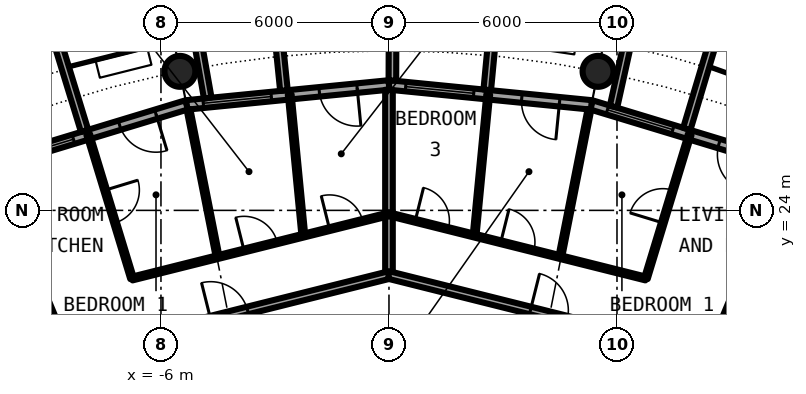
"""IFC4 building model, lengths in metres.
Left out: names, types, materials, properties, quantities, classifications, styles, units other than length and angle.
Written with IfcOpenShell. Run it as: python <this file> out.ifc"""

import sys

from ifc_helpers import new_model, si_unit, direction, frame, frame_2d, origin, origin_2d, place, context, subcontext, project, spatial, rectangle, circle, hollow_circle, extrude, element, fill, save


model = new_model("IFC4")
c1 = context("Model", 3, precision=1e-05, world=origin(), true_north=direction((0.0, 1.0)))
c2 = subcontext(c1, "Body", "Model", "MODEL_VIEW")
j1 = project(units=[si_unit("LENGTHUNIT", "METRE"), si_unit("PLANEANGLEUNIT", "RADIAN")], contexts=[c1])
p1 = place(None, origin())
s1 = spatial("IfcSite", under=j1, at=p1, CompositionType="ELEMENT")
p2 = place(p1, origin())
s2 = spatial("IfcBuilding", under=s1, at=p2, CompositionType="ELEMENT")
p3 = place(p2, frame((0.0, 0.0, 154.35)))
s3 = spatial("IfcBuildingStorey", under=s2, at=p3, CompositionType="ELEMENT", Elevation=154.35)
for number, where, z_axis, x_axis in (
    (1, (5.501, 27.658, 0.0), (0.0, 0.0, 1.0), (1.0, 0.0, 0.0)),
    (2, (-5.501, 27.658, 0.0), (0.0, 0.0, 1.0), (1.0, 0.0, 0.0)),
):
    element("IfcColumn", number, at=place(p3, frame(where, z_axis=z_axis, x_axis=x_axis)), inside=s3, PredefinedType="COLUMN", context=c2, shape_type="SweptSolid", body=[
        extrude(hollow_circle(Radius=0.406, WallThickness=0.04, at=origin_2d()), origin(), (0.0, 0.0, 1.0), 3.05),
    ])
p4 = place(p3, frame((10.447, 25.222, 0.0), z_axis=(0.0, 0.0, 1.0), x_axis=(-0.956965678721, 0.290201119486, 0.0)))
e3 = element("IfcWall", 3, at=p4, inside=s3, PredefinedType="SOLIDWALL", context=c2, shape_type="SweptSolid", body=[
    extrude(rectangle(XDim=5.351, YDim=0.25, at=frame_2d((2.676, 0.0))), origin(), (0.0, 0.0, 1.0), 2.7),
])
p5 = place(p4, frame((0.841, 0.0, 0.0)))
e4 = element("IfcOpeningElement", 4, at=p5, cuts=e3, PredefinedType="OPENING", context=c2, shape_type="SweptSolid", body=[
    extrude(rectangle(XDim=1.0, YDim=2.2, at=frame_2d((0.5, 1.1))), frame((0.0, 0.135, 0.0), z_axis=(0.0, -1.0, 0.0), x_axis=(1.0, 0.0, 0.0)), (0.0, 0.0, 1.0), 0.27),
])
p6 = place(p4, frame((3.111, 0.0, 0.3)))
e5 = element("IfcOpeningElement", 5, at=p6, cuts=e3, PredefinedType="OPENING", context=c2, shape_type="SweptSolid", body=[
    extrude(rectangle(XDim=1.8, YDim=2.1, at=frame_2d((0.9, 1.05))), frame((0.0, 0.135, 0.0), z_axis=(0.0, -1.0, 0.0), x_axis=(1.0, 0.0, 0.0)), (0.0, 0.0, 1.0), 0.27),
])
p7 = place(p3, frame((7.837, 26.144, -0.03), z_axis=(0.0, 0.0, 1.0), x_axis=(0.287064767992, 0.957911174889, 0.0)))
e6 = element("IfcWall", 6, at=p7, inside=s3, PredefinedType="SOLIDWALL", context=c2, shape_type="SweptSolid", body=[
    extrude(rectangle(XDim=3.006, YDim=0.2, at=frame_2d((1.503, 0.0))), origin(), (0.0, 0.0, 1.0), 2.73),
])
p8 = place(p3, frame((5.909, 26.729, -0.03), z_axis=(0.0, 0.0, 1.0), x_axis=(0.216409053917, 0.976302781612, 0.0)))
e7 = element("IfcWall", 7, at=p8, inside=s3, PredefinedType="SOLIDWALL", context=c2, shape_type="SweptSolid", body=[
    extrude(rectangle(XDim=2.925, YDim=0.2, at=frame_2d((1.463, 0.0))), origin(), (0.0, 0.0, 1.0), 2.73),
])
p9 = place(p3, frame((5.326, 26.775, 0.0), z_axis=(0.0, 0.0, 1.0), x_axis=(-0.995173996315, 0.098126026407, 0.0)))
e8 = element("IfcWall", 8, at=p9, inside=s3, PredefinedType="SOLIDWALL", context=c2, shape_type="SweptSolid", body=[
    extrude(rectangle(XDim=5.352, YDim=0.25, at=frame_2d((2.676, 0.0))), origin(), (0.0, 0.0, 1.0), 2.7),
])
p10 = place(p9, frame((0.841, 0.0, 0.0)))
e9 = element("IfcOpeningElement", 9, at=p10, cuts=e8, PredefinedType="OPENING", context=c2, shape_type="SweptSolid", body=[
    extrude(rectangle(XDim=1.0, YDim=2.2, at=frame_2d((0.5, 1.1))), frame((0.0, 0.135, 0.0), z_axis=(0.0, -1.0, 0.0), x_axis=(1.0, 0.0, 0.0)), (0.0, 0.0, 1.0), 0.27),
])
p11 = place(p9, frame((3.111, 0.0, 0.3)))
e10 = element("IfcOpeningElement", 10, at=p11, cuts=e8, PredefinedType="OPENING", context=c2, shape_type="SweptSolid", body=[
    extrude(rectangle(XDim=1.8, YDim=2.1, at=frame_2d((0.9, 1.05))), frame((0.0, 0.135, 0.0), z_axis=(0.0, -1.0, 0.0), x_axis=(1.0, 0.0, 0.0)), (0.0, 0.0, 1.0), 0.27),
])
p12 = place(p3, frame((2.586, 27.171, -0.03), z_axis=(0.0, 0.0, 1.0), x_axis=(0.094548432284, 0.995520262954, 0.0)))
e11 = element("IfcWall", 11, at=p12, inside=s3, PredefinedType="SOLIDWALL", context=c2, shape_type="SweptSolid", body=[
    extrude(rectangle(XDim=3.006, YDim=0.2, at=frame_2d((1.503, 0.0))), origin(), (0.0, 0.0, 1.0), 2.73),
])
p13 = place(p3, frame((0.09, 27.417, -0.03), z_axis=(0.0, 0.0, 1.0), x_axis=(0.00347308367, 0.999993968827, 0.0)))
e12 = element("IfcWall", 12, at=p13, inside=s3, PredefinedType="SOLIDWALL", context=c2, shape_type="SweptSolid", body=[
    extrude(rectangle(XDim=2.882, YDim=0.2, at=frame_2d((1.441, 0.0))), origin(), (0.0, 0.0, 1.0), 2.73),
])
p14 = place(p3, frame((0.0, 27.3, 0.0), z_axis=(0.0, 0.0, 1.0), x_axis=(-0.995173996315, -0.098126026407, 0.0)))
e13 = element("IfcWall", 13, at=p14, inside=s3, PredefinedType="SOLIDWALL", context=c2, shape_type="SweptSolid", body=[
    extrude(rectangle(XDim=5.352, YDim=0.25, at=frame_2d((2.676, 0.0))), origin(), (0.0, 0.0, 1.0), 2.7),
])
p15 = place(p14, frame((0.841, 0.0, 0.0)))
e14 = element("IfcOpeningElement", 14, at=p15, cuts=e13, PredefinedType="OPENING", context=c2, shape_type="SweptSolid", body=[
    extrude(rectangle(XDim=1.0, YDim=2.2, at=frame_2d((0.5, 1.1))), frame((0.0, 0.135, 0.0), z_axis=(0.0, -1.0, 0.0), x_axis=(1.0, 0.0, 0.0)), (0.0, 0.0, 1.0), 0.27),
])
p16 = place(p14, frame((3.111, 0.0, 0.3)))
e15 = element("IfcOpeningElement", 15, at=p16, cuts=e13, PredefinedType="OPENING", context=c2, shape_type="SweptSolid", body=[
    extrude(rectangle(XDim=1.8, YDim=2.1, at=frame_2d((0.9, 1.05))), frame((0.0, 0.135, 0.0), z_axis=(0.0, -1.0, 0.0), x_axis=(1.0, 0.0, 0.0)), (0.0, 0.0, 1.0), 0.27),
])
p17 = place(p3, frame((-2.764, 27.153, -0.03), z_axis=(0.0, 0.0, 1.0), x_axis=(-0.101505487237, 0.994834979311, 0.0)))
e16 = element("IfcWall", 16, at=p17, inside=s3, PredefinedType="SOLIDWALL", context=c2, shape_type="SweptSolid", body=[
    extrude(rectangle(XDim=3.007, YDim=0.2, at=frame_2d((1.503, 0.0))), origin(), (0.0, 0.0, 1.0), 2.73),
])
p18 = place(p3, frame((-4.769, 26.956, -0.03), z_axis=(0.0, 0.0, 1.0), x_axis=(-0.174056778901, 0.984735618183, 0.0)))
e17 = element("IfcWall", 17, at=p18, inside=s3, PredefinedType="SOLIDWALL", context=c2, shape_type="SweptSolid", body=[
    extrude(rectangle(XDim=2.925, YDim=0.2, at=frame_2d((1.462, 0.0))), origin(), (0.0, 0.0, 1.0), 2.73),
])
p19 = place(p3, frame((-5.326, 26.775, 0.0), z_axis=(0.0, 0.0, 1.0), x_axis=(-0.956965678721, -0.290201119486, 0.0)))
e18 = element("IfcWall", 18, at=p19, inside=s3, PredefinedType="SOLIDWALL", context=c2, shape_type="SweptSolid", body=[
    extrude(rectangle(XDim=5.351, YDim=0.25, at=frame_2d((2.676, 0.0))), origin(), (0.0, 0.0, 1.0), 2.7),
])
p20 = place(p19, frame((0.841, 0.0, 0.0)))
e19 = element("IfcOpeningElement", 19, at=p20, cuts=e18, PredefinedType="OPENING", context=c2, shape_type="SweptSolid", body=[
    extrude(rectangle(XDim=1.0, YDim=2.2, at=frame_2d((0.5, 1.1))), frame((0.0, 0.135, 0.0), z_axis=(0.0, -1.0, 0.0), x_axis=(1.0, 0.0, 0.0)), (0.0, 0.0, 1.0), 0.27),
])
p21 = place(p19, frame((3.111, 0.0, 0.3)))
e20 = element("IfcOpeningElement", 20, at=p21, cuts=e18, PredefinedType="OPENING", context=c2, shape_type="SweptSolid", body=[
    extrude(rectangle(XDim=1.8, YDim=2.1, at=frame_2d((0.9, 1.05))), frame((0.0, 0.135, 0.0), z_axis=(0.0, -1.0, 0.0), x_axis=(1.0, 0.0, 0.0)), (0.0, 0.0, 1.0), 0.27),
])
p22 = place(p3, frame((-8.82, 29.093, -0.03), z_axis=(0.0, 0.0, 1.0), x_axis=(-0.941461077774, -0.337121697664, 0.0)))
e21 = element("IfcWall", 21, at=p22, inside=s3, PredefinedType="SOLIDWALL", context=c2, shape_type="SweptSolid", body=[
    extrude(rectangle(XDim=2.993, YDim=0.2, at=frame_2d((1.497, 0.0))), origin(), (0.0, 0.0, 1.0), 2.73),
])
p23 = place(p22, frame((0.457, 0.0, 0.33)))
e22 = element("IfcOpeningElement", 22, at=p23, cuts=e21, PredefinedType="OPENING", context=c2, shape_type="SweptSolid", body=[
    extrude(circle(Radius=1.04, at=frame_2d((1.04, 1.04))), frame((0.0, 0.11, 0.0), z_axis=(0.0, -1.0, 0.0), x_axis=(1.0, 0.0, 0.0)), (0.0, 0.0, 1.0), 0.22),
])
p24 = place(p3, frame((-8.009, 26.092, -0.03), z_axis=(0.0, 0.0, 1.0), x_axis=(-0.293406695073, 0.955987715029, 0.0)))
e23 = element("IfcWall", 23, at=p24, inside=s3, PredefinedType="SOLIDWALL", context=c2, shape_type="SweptSolid", body=[
    extrude(rectangle(XDim=3.006, YDim=0.2, at=frame_2d((1.503, 0.0))), origin(), (0.0, 0.0, 1.0), 2.73),
])
for number, where, z_axis, x_axis in (
    (24, (-9.013, 21.642, 0.0), (0.0, 0.0, 1.0), (0.384, -0.923, 0.0)),
    (25, (8.41, 20.193, 0.0), (0.0, 0.0, 1.0), (0.384, 0.923, 0.0)),
):
    element("IfcWall", number, at=place(p3, frame(where, z_axis=z_axis, x_axis=x_axis)), inside=s3, PredefinedType="PARTITIONING", context=c2, shape_type="SweptSolid", body=[
        extrude(rectangle(XDim=1.569, YDim=0.1, at=frame_2d((0.785, 0.0))), origin(), (0.0, 0.0, 1.0), 2.7),
    ])
p25 = place(p3, frame((-7.914, 25.997, 0.0), z_axis=(0.0, 0.0, 1.0), x_axis=(0.291291575636, -0.956634317785, 0.0)))
e26 = element("IfcWall", 26, at=p25, inside=s3, PredefinedType="PARTITIONING", context=c2, shape_type="SweptSolid", body=[
    extrude(rectangle(XDim=3.962, YDim=0.1, at=frame_2d((1.981, 0.0))), origin(), (0.0, 0.0, 1.0), 2.7),
])
p26 = place(p25, frame((1.531, 0.0, 0.0)))
e27 = element("IfcOpeningElement", 27, at=p26, cuts=e26, PredefinedType="OPENING", context=c2, shape_type="SweptSolid", body=[
    extrude(rectangle(XDim=0.9, YDim=2.3, at=frame_2d((0.45, 1.15))), frame((0.0, 0.06, 0.0), z_axis=(0.0, -1.0, 0.0), x_axis=(1.0, 0.0, 0.0)), (0.0, 0.0, 1.0), 0.12),
])
p27 = place(p3, frame((-5.276, 26.658, 0.0), z_axis=(0.0, 0.0, 1.0), x_axis=(0.194030211642, -0.980995554001, 0.0)))
e28 = element("IfcWall", 28, at=p27, inside=s3, PredefinedType="PARTITIONING", context=c2, shape_type="SweptSolid", body=[
    extrude(rectangle(XDim=3.962, YDim=0.1, at=frame_2d((1.981, 0.0))), origin(), (0.0, 0.0, 1.0), 2.7),
])
p28 = place(p3, frame((-2.612, 27.049, 0.0), z_axis=(0.0, 0.0, 1.0), x_axis=(0.09626981452, -0.995355274669, 0.0)))
e29 = element("IfcWall", 29, at=p28, inside=s3, PredefinedType="PARTITIONING", context=c2, shape_type="SweptSolid", body=[
    extrude(rectangle(XDim=3.73, YDim=0.1, at=frame_2d((1.865, 0.0))), origin(), (0.0, 0.0, 1.0), 2.7),
])
p29 = place(p3, frame((0.0, 22.3, 0.0), z_axis=(0.0, 0.0, 1.0), x_axis=(0.0, 1.0, 0.0)))
e30 = element("IfcWall", 30, at=p29, inside=s3, PredefinedType="PARTITIONING", context=c2, shape_type="SweptSolid", body=[
    extrude(rectangle(XDim=4.875, YDim=0.2, at=frame_2d((2.438, 0.0))), origin(), (0.0, 0.0, 1.0), 2.7),
])
p30 = place(p3, frame((2.253, 23.336, 0.0), z_axis=(0.0, 0.0, 1.0), x_axis=(0.09626981452, 0.995355274669, 0.0)))
e31 = element("IfcWall", 31, at=p30, inside=s3, PredefinedType="PARTITIONING", context=c2, shape_type="SweptSolid", body=[
    extrude(rectangle(XDim=3.73, YDim=0.1, at=frame_2d((1.865, 0.0))), origin(), (0.0, 0.0, 1.0), 2.7),
])
p31 = place(p3, frame((4.507, 22.771, 0.0), z_axis=(0.0, 0.0, 1.0), x_axis=(0.194030211642, 0.980995554001, 0.0)))
e32 = element("IfcWall", 32, at=p31, inside=s3, PredefinedType="PARTITIONING", context=c2, shape_type="SweptSolid", body=[
    extrude(rectangle(XDim=3.962, YDim=0.1, at=frame_2d((1.981, 0.0))), origin(), (0.0, 0.0, 1.0), 2.7),
])
p32 = place(p3, frame((6.76, 22.207, 0.0), z_axis=(0.0, 0.0, 1.0), x_axis=(0.291291575636, 0.956634317785, 0.0)))
e33 = element("IfcWall", 33, at=p32, inside=s3, PredefinedType="PARTITIONING", context=c2, shape_type="SweptSolid", body=[
    extrude(rectangle(XDim=3.962, YDim=0.1, at=frame_2d((1.981, 0.0))), origin(), (0.0, 0.0, 1.0), 2.7),
])
p33 = place(p32, frame((1.531, 0.0, 0.0)))
e34 = element("IfcOpeningElement", 34, at=p33, cuts=e33, PredefinedType="OPENING", context=c2, shape_type="SweptSolid", body=[
    extrude(rectangle(XDim=0.9, YDim=2.3, at=frame_2d((0.45, 1.15))), frame((0.0, 0.06, 0.0), z_axis=(0.0, -1.0, 0.0), x_axis=(1.0, 0.0, 0.0)), (0.0, 0.0, 1.0), 0.12),
])
p34 = place(p3, frame((-10.512, 19.667, 0.0), z_axis=(0.0, 0.0, 1.0), x_axis=(0.970086843848, 0.242758141765, 0.0)))
e35 = element("IfcWall", 35, at=p34, inside=s3, PredefinedType="PARTITIONING", context=c2, shape_type="SweptSolid", body=[
    extrude(rectangle(XDim=10.842, YDim=0.2, at=frame_2d((5.421, 0.0))), origin(), (0.0, 0.0, 1.0), 2.7),
])
p35 = place(p34, frame((6.002, 0.0, 0.0)))
e36 = element("IfcOpeningElement", 36, at=p35, cuts=e35, PredefinedType="OPENING", context=c2, shape_type="SweptSolid", body=[
    extrude(rectangle(XDim=1.0, YDim=2.3, at=frame_2d((0.5, 1.15))), frame((0.0, 0.11, 0.0), z_axis=(0.0, -1.0, 0.0), x_axis=(1.0, 0.0, 0.0)), (0.0, 0.0, 1.0), 0.22),
])
p36 = place(p3, frame((-0.006, 22.299, 0.0), z_axis=(0.0, 0.0, 1.0), x_axis=(0.970086843848, -0.242758141765, 0.0)))
e37 = element("IfcWall", 37, at=p36, inside=s3, PredefinedType="PARTITIONING", context=c2, shape_type="SweptSolid", body=[
    extrude(rectangle(XDim=10.842, YDim=0.2, at=frame_2d((5.421, 0.0))), origin(), (0.0, 0.0, 1.0), 2.7),
])
p37 = place(p36, frame((3.841, 0.0, 0.0)))
e38 = element("IfcOpeningElement", 38, at=p37, cuts=e37, PredefinedType="OPENING", context=c2, shape_type="SweptSolid", body=[
    extrude(rectangle(XDim=1.0, YDim=2.3, at=frame_2d((0.5, 1.15))), frame((0.0, 0.11, 0.0), z_axis=(0.0, -1.0, 0.0), x_axis=(1.0, 0.0, 0.0)), (0.0, 0.0, 1.0), 0.22),
])
p38 = place(p3, frame((-6.76, 22.206, 0.0), z_axis=(0.0, 0.0, 1.0), x_axis=(0.970070358667, 0.242824008772, 0.0)))
e39 = element("IfcWall", 39, at=p38, inside=s3, PredefinedType="PARTITIONING", context=c2, shape_type="SweptSolid", body=[
    extrude(rectangle(XDim=6.972, YDim=0.1, at=frame_2d((3.486, 0.0))), origin(), (0.0, 0.0, 1.0), 2.7),
])
p39 = place(p38, frame((3.037, 0.0, 0.0)))
e40 = element("IfcOpeningElement", 40, at=p39, cuts=e39, PredefinedType="OPENING", context=c2, shape_type="SweptSolid", body=[
    extrude(rectangle(XDim=0.9, YDim=2.3, at=frame_2d((0.45, 1.15))), frame((0.0, 0.06, 0.0), z_axis=(0.0, -1.0, 0.0), x_axis=(1.0, 0.0, 0.0)), (0.0, 0.0, 1.0), 0.12),
])
p40 = place(p38, frame((5.357, 0.0, 0.0)))
e41 = element("IfcOpeningElement", 41, at=p40, cuts=e39, PredefinedType="OPENING", context=c2, shape_type="SweptSolid", body=[
    extrude(rectangle(XDim=0.9, YDim=2.3, at=frame_2d((0.45, 1.15))), frame((0.0, 0.06, 0.0), z_axis=(0.0, -1.0, 0.0), x_axis=(1.0, 0.0, 0.0)), (0.0, 0.0, 1.0), 0.12),
])
p41 = place(p3, frame((-0.003, 23.899, 0.0), z_axis=(0.0, 0.0, 1.0), x_axis=(0.970070358667, -0.242824008772, 0.0)))
e42 = element("IfcWall", 42, at=p41, inside=s3, PredefinedType="PARTITIONING", context=c2, shape_type="SweptSolid", body=[
    extrude(rectangle(XDim=6.972, YDim=0.1, at=frame_2d((3.486, 0.0))), origin(), (0.0, 0.0, 1.0), 2.7),
])
p42 = place(p41, frame((3.035, 0.0, 0.0)))
e43 = element("IfcOpeningElement", 43, at=p42, cuts=e42, PredefinedType="OPENING", context=c2, shape_type="SweptSolid", body=[
    extrude(rectangle(XDim=0.9, YDim=2.3, at=frame_2d((0.45, 1.15))), frame((0.0, 0.06, 0.0), z_axis=(0.0, -1.0, 0.0), x_axis=(1.0, 0.0, 0.0)), (0.0, 0.0, 1.0), 0.12),
])
p43 = place(p41, frame((0.715, 0.0, 0.0)))
e44 = element("IfcOpeningElement", 44, at=p43, cuts=e42, PredefinedType="OPENING", context=c2, shape_type="SweptSolid", body=[
    extrude(rectangle(XDim=0.9, YDim=2.3, at=frame_2d((0.45, 1.15))), frame((0.0, 0.06, 0.0), z_axis=(0.0, -1.0, 0.0), x_axis=(1.0, 0.0, 0.0)), (0.0, 0.0, 1.0), 0.12),
])
p44 = place(p5, origin())
e45 = element("IfcDoor", 45, at=p44, inside=s3, OperationType="SINGLE_SWING_LEFT", PredefinedType="DOOR", context=c2, shape_type="SweptSolid", body=[
    extrude(rectangle(XDim=1.0, YDim=2.2, at=frame_2d((0.5, 1.1))), frame((0.0, 0.025, 0.0), z_axis=(0.0, -1.0, 0.0), x_axis=(1.0, 0.0, 0.0)), (0.0, 0.0, 1.0), 0.05),
])
fill(e4, e45)
p45 = place(p6, origin())
e46 = element("IfcWindow", 46, at=p45, inside=s3, PartitioningType="SINGLE_PANEL", PredefinedType="WINDOW", context=c2, shape_type="SweptSolid", body=[
    extrude(rectangle(XDim=1.8, YDim=2.1, at=frame_2d((0.9, 1.05))), frame((0.0, 0.03, 0.0), z_axis=(0.0, -1.0, 0.0), x_axis=(1.0, 0.0, 0.0)), (0.0, 0.0, 1.0), 0.06),
])
fill(e5, e46)
p46 = place(p10, origin())
e47 = element("IfcDoor", 47, at=p46, inside=s3, OperationType="SINGLE_SWING_LEFT", PredefinedType="DOOR", context=c2, shape_type="SweptSolid", body=[
    extrude(rectangle(XDim=1.0, YDim=2.2, at=frame_2d((0.5, 1.1))), frame((0.0, 0.025, 0.0), z_axis=(0.0, -1.0, 0.0), x_axis=(1.0, 0.0, 0.0)), (0.0, 0.0, 1.0), 0.05),
])
fill(e9, e47)
p47 = place(p11, origin())
e48 = element("IfcWindow", 48, at=p47, inside=s3, PartitioningType="SINGLE_PANEL", PredefinedType="WINDOW", context=c2, shape_type="SweptSolid", body=[
    extrude(rectangle(XDim=1.8, YDim=2.1, at=frame_2d((0.9, 1.05))), frame((0.0, 0.03, 0.0), z_axis=(0.0, -1.0, 0.0), x_axis=(1.0, 0.0, 0.0)), (0.0, 0.0, 1.0), 0.06),
])
fill(e10, e48)
p48 = place(p15, origin())
e49 = element("IfcDoor", 49, at=p48, inside=s3, OperationType="SINGLE_SWING_LEFT", PredefinedType="DOOR", context=c2, shape_type="SweptSolid", body=[
    extrude(rectangle(XDim=1.0, YDim=2.2, at=frame_2d((0.5, 1.1))), frame((0.0, 0.025, 0.0), z_axis=(0.0, -1.0, 0.0), x_axis=(1.0, 0.0, 0.0)), (0.0, 0.0, 1.0), 0.05),
])
fill(e14, e49)
p49 = place(p16, origin())
e50 = element("IfcWindow", 50, at=p49, inside=s3, PartitioningType="SINGLE_PANEL", PredefinedType="WINDOW", context=c2, shape_type="SweptSolid", body=[
    extrude(rectangle(XDim=1.8, YDim=2.1, at=frame_2d((0.9, 1.05))), frame((0.0, 0.03, 0.0), z_axis=(0.0, -1.0, 0.0), x_axis=(1.0, 0.0, 0.0)), (0.0, 0.0, 1.0), 0.06),
])
fill(e15, e50)
p50 = place(p20, origin())
e51 = element("IfcDoor", 51, at=p50, inside=s3, OperationType="SINGLE_SWING_LEFT", PredefinedType="DOOR", context=c2, shape_type="SweptSolid", body=[
    extrude(rectangle(XDim=1.0, YDim=2.2, at=frame_2d((0.5, 1.1))), frame((0.0, 0.025, 0.0), z_axis=(0.0, -1.0, 0.0), x_axis=(1.0, 0.0, 0.0)), (0.0, 0.0, 1.0), 0.05),
])
fill(e19, e51)
p51 = place(p21, origin())
e52 = element("IfcWindow", 52, at=p51, inside=s3, PartitioningType="SINGLE_PANEL", PredefinedType="WINDOW", context=c2, shape_type="SweptSolid", body=[
    extrude(rectangle(XDim=1.8, YDim=2.1, at=frame_2d((0.9, 1.05))), frame((0.0, 0.03, 0.0), z_axis=(0.0, -1.0, 0.0), x_axis=(1.0, 0.0, 0.0)), (0.0, 0.0, 1.0), 0.06),
])
fill(e20, e52)
p52 = place(p37, origin())
e53 = element("IfcDoor", 53, at=p52, inside=s3, OperationType="SINGLE_SWING_LEFT", PredefinedType="DOOR", context=c2, shape_type="SweptSolid", body=[
    extrude(rectangle(XDim=1.0, YDim=2.3, at=frame_2d((0.5, 1.15))), frame((0.0, 0.025, 0.0), z_axis=(0.0, -1.0, 0.0), x_axis=(1.0, 0.0, 0.0)), (0.0, 0.0, 1.0), 0.05),
])
fill(e38, e53)
p53 = place(p33, origin())
e54 = element("IfcDoor", 54, at=p53, inside=s3, OperationType="SINGLE_SWING_RIGHT", PredefinedType="DOOR", context=c2, shape_type="SweptSolid", body=[
    extrude(rectangle(XDim=0.9, YDim=2.3, at=frame_2d((0.45, 1.15))), frame((0.0, 0.025, 0.0), z_axis=(0.0, -1.0, 0.0), x_axis=(1.0, 0.0, 0.0)), (0.0, 0.0, 1.0), 0.05),
])
fill(e34, e54)
p54 = place(p42, origin())
e55 = element("IfcDoor", 55, at=p54, inside=s3, OperationType="SINGLE_SWING_LEFT", PredefinedType="DOOR", context=c2, shape_type="SweptSolid", body=[
    extrude(rectangle(XDim=0.9, YDim=2.3, at=frame_2d((0.45, 1.15))), frame((0.0, 0.025, 0.0), z_axis=(0.0, -1.0, 0.0), x_axis=(1.0, 0.0, 0.0)), (0.0, 0.0, 1.0), 0.05),
])
fill(e43, e55)
p55 = place(p43, origin())
e56 = element("IfcDoor", 56, at=p55, inside=s3, OperationType="SINGLE_SWING_LEFT", PredefinedType="DOOR", context=c2, shape_type="SweptSolid", body=[
    extrude(rectangle(XDim=0.9, YDim=2.3, at=frame_2d((0.45, 1.15))), frame((0.0, 0.025, 0.0), z_axis=(0.0, -1.0, 0.0), x_axis=(1.0, 0.0, 0.0)), (0.0, 0.0, 1.0), 0.05),
])
fill(e44, e56)
p56 = place(p35, origin())
e57 = element("IfcDoor", 57, at=p56, inside=s3, OperationType="SINGLE_SWING_RIGHT", PredefinedType="DOOR", context=c2, shape_type="SweptSolid", body=[
    extrude(rectangle(XDim=1.0, YDim=2.3, at=frame_2d((0.5, 1.15))), frame((0.0, 0.025, 0.0), z_axis=(0.0, -1.0, 0.0), x_axis=(1.0, 0.0, 0.0)), (0.0, 0.0, 1.0), 0.05),
])
fill(e36, e57)
p57 = place(p26, origin())
e58 = element("IfcDoor", 58, at=p57, inside=s3, OperationType="SINGLE_SWING_RIGHT", PredefinedType="DOOR", context=c2, shape_type="SweptSolid", body=[
    extrude(rectangle(XDim=0.9, YDim=2.3, at=frame_2d((0.45, 1.15))), frame((0.0, 0.025, 0.0), z_axis=(0.0, -1.0, 0.0), x_axis=(1.0, 0.0, 0.0)), (0.0, 0.0, 1.0), 0.05),
])
fill(e27, e58)
p58 = place(p39, origin())
e59 = element("IfcDoor", 59, at=p58, inside=s3, OperationType="SINGLE_SWING_RIGHT", PredefinedType="DOOR", context=c2, shape_type="SweptSolid", body=[
    extrude(rectangle(XDim=0.9, YDim=2.3, at=frame_2d((0.45, 1.15))), frame((0.0, 0.025, 0.0), z_axis=(0.0, -1.0, 0.0), x_axis=(1.0, 0.0, 0.0)), (0.0, 0.0, 1.0), 0.05),
])
fill(e40, e59)
p59 = place(p40, origin())
e60 = element("IfcDoor", 60, at=p59, inside=s3, OperationType="SINGLE_SWING_RIGHT", PredefinedType="DOOR", context=c2, shape_type="SweptSolid", body=[
    extrude(rectangle(XDim=0.9, YDim=2.3, at=frame_2d((0.45, 1.15))), frame((0.0, 0.025, 0.0), z_axis=(0.0, -1.0, 0.0), x_axis=(1.0, 0.0, 0.0)), (0.0, 0.0, 1.0), 0.05),
])
fill(e41, e60)
save(model, sys.argv[1])
